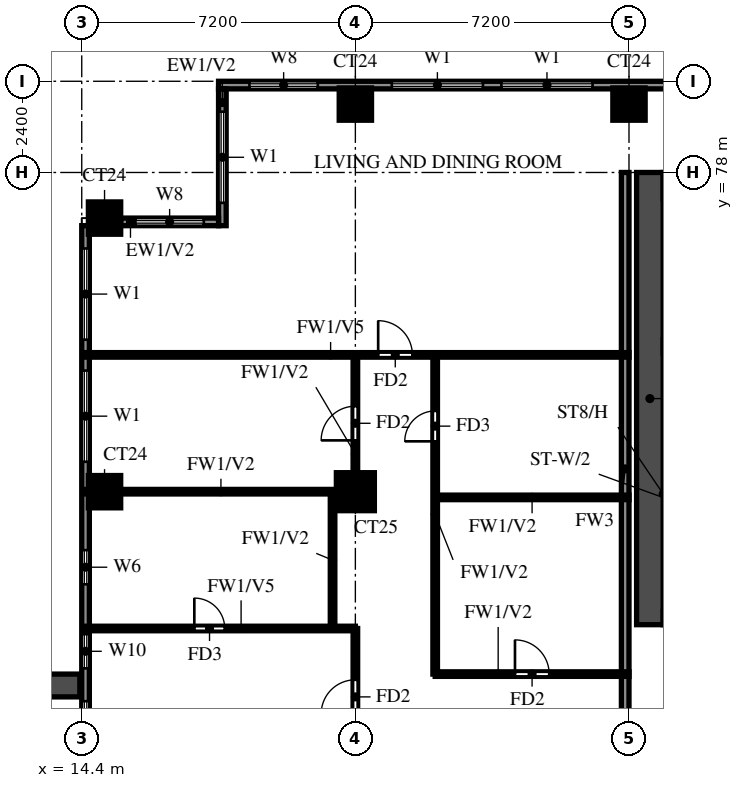
"""IFC4 building model, lengths in metres.
Left out: names, types, materials, properties, quantities, classifications, styles, units other than length and angle.
Written with IfcOpenShell. Run it as: python <this file> out.ifc"""

import sys

from ifc_helpers import new_model, si_unit, direction, frame, frame_2d, origin, origin_2d, place, context, subcontext, project, spatial, rectangle, extrude, source, transform, mapped, element, fill, save


model = new_model("IFC4")
c1 = context("Model", 3, precision=1e-05, world=origin(), true_north=direction((0.0, 1.0)))
c2 = subcontext(c1, "Body", "Model", "MODEL_VIEW")
j1 = project(units=[si_unit("LENGTHUNIT", "METRE"), si_unit("PLANEANGLEUNIT", "RADIAN")], contexts=[c1])
p1 = place(None, origin())
s1 = spatial("IfcSite", under=j1, at=p1, CompositionType="ELEMENT")
p2 = place(p1, origin())
s2 = spatial("IfcBuilding", under=s1, at=p2, CompositionType="ELEMENT")
p3 = place(p2, frame((0.0, 0.0, 167.5)))
s3 = spatial("IfcBuildingStorey", under=s2, at=p3, CompositionType="ELEMENT", Elevation=167.5)
m1 = source(origin(), c2, "Body", "SweptSolid", [
    extrude(rectangle(XDim=0.85, YDim=0.85, at=origin_2d()), origin(), (0.0, 0.0, 1.0), 3.2),
])
p4 = place(p3, frame((15.0, 69.6, 0.0), z_axis=(0.0, 0.0, 1.0), x_axis=(1.0, 0.0, 0.0)))
e1 = element("IfcColumn", 1, at=p4, inside=s3, PredefinedType="COLUMN", context=c2, shape_type="MappedRepresentation", body=[
    mapped(m1, transform((0.0, 0.0, 0.0))),
])
m2 = source(origin(), c2, "Body", "SweptSolid", [
    extrude(rectangle(XDim=1.0, YDim=1.0, at=origin_2d()), origin(), (0.0, 0.0, 1.0), 3.2),
])
p5 = place(p3, frame((21.6, 69.6, 0.0), z_axis=(0.0, 0.0, 1.0), x_axis=(1.0, 0.0, 0.0)))
e2 = element("IfcColumn", 2, at=p5, inside=s3, PredefinedType="COLUMN", context=c2, shape_type="MappedRepresentation", body=[
    mapped(m2, transform((0.0, 0.0, 0.0))),
])
for number, where, z_axis, x_axis in (
    (3, (15.0, 76.8, 0.0), (0.0, 0.0, 1.0), (1.0, 0.0, 0.0)),
    (4, (21.6, 79.8, 0.0), (0.0, 0.0, 1.0), (1.0, 0.0, 0.0)),
    (5, (28.8, 79.8, 0.0), (0.0, 0.0, 1.0), (1.0, 0.0, 0.0)),
):
    element("IfcColumn", number, at=place(p3, frame(where, z_axis=z_axis, x_axis=x_axis)), inside=s3, PredefinedType="COLUMN", context=c2, shape_type="MappedRepresentation", body=[
        mapped(m1, transform((0.0, 0.0, 0.0))),
    ])
p6 = place(p3, frame((29.35, 66.1, 0.0), z_axis=(0.0, 0.0, 1.0), x_axis=(0.0, 1.0, 0.0)))
e6 = element("IfcWall", 6, at=p6, inside=s3, PredefinedType="SHEAR", context=c2, shape_type="SweptSolid", body=[
    extrude(rectangle(XDim=11.9, YDim=0.7, at=frame_2d((5.95, 0.0))), origin(), (0.0, 0.0, 1.0), 3.2),
])
p7 = place(p3, frame((72.0, 80.3, 0.0), z_axis=(0.0, 0.0, 1.0), x_axis=(-1.0, 0.0, 0.0)))
e7 = element("IfcWall", 7, at=p7, inside=s3, PredefinedType="SOLIDWALL", context=c2, shape_type="SweptSolid", body=[
    extrude(rectangle(XDim=54.0, YDim=0.2, at=frame_2d((27.0, 0.0))), origin(), (0.0, 0.0, 1.0), 3.2),
])
p8 = place(p7, frame((44.158, 0.0, 0.6)))
e8 = element("IfcOpeningElement", 8, at=p8, cuts=e7, PredefinedType="OPENING", context=c2, shape_type="SweptSolid", body=[
    extrude(rectangle(XDim=2.4, YDim=2.4, at=frame_2d((1.2, 1.2))), frame((0.0, 0.11, 0.0), z_axis=(0.0, -1.0, 0.0), x_axis=(1.0, 0.0, 0.0)), (0.0, 0.0, 1.0), 0.22),
])
p9 = place(p7, frame((47.042, 0.0, 0.6)))
e9 = element("IfcOpeningElement", 9, at=p9, cuts=e7, PredefinedType="OPENING", context=c2, shape_type="SweptSolid", body=[
    extrude(rectangle(XDim=2.4, YDim=2.4, at=frame_2d((1.2, 1.2))), frame((0.0, 0.11, 0.0), z_axis=(0.0, -1.0, 0.0), x_axis=(1.0, 0.0, 0.0)), (0.0, 0.0, 1.0), 0.22),
])
p10 = place(p7, frame((51.387, 0.0, 0.6)))
e10 = element("IfcOpeningElement", 10, at=p10, cuts=e7, PredefinedType="OPENING", context=c2, shape_type="SweptSolid", body=[
    extrude(rectangle(XDim=1.8, YDim=2.4, at=frame_2d((0.9, 1.2))), frame((0.0, 0.11, 0.0), z_axis=(0.0, -1.0, 0.0), x_axis=(1.0, 0.0, 0.0)), (0.0, 0.0, 1.0), 0.22),
])
p11 = place(p3, frame((18.1, 80.2, 0.0), z_axis=(0.0, 0.0, 1.0), x_axis=(0.0, -1.0, 0.0)))
e11 = element("IfcWall", 11, at=p11, inside=s3, PredefinedType="SOLIDWALL", context=c2, shape_type="SweptSolid", body=[
    extrude(rectangle(XDim=3.6, YDim=0.2, at=frame_2d((1.8, 0.0))), origin(), (0.0, 0.0, 1.0), 3.2),
])
p12 = place(p11, frame((0.6, 0.0, 0.6)))
e12 = element("IfcOpeningElement", 12, at=p12, cuts=e11, PredefinedType="OPENING", context=c2, shape_type="SweptSolid", body=[
    extrude(rectangle(XDim=2.4, YDim=2.4, at=frame_2d((1.2, 1.2))), frame((0.0, 0.11, 0.0), z_axis=(0.0, -1.0, 0.0), x_axis=(1.0, 0.0, 0.0)), (0.0, 0.0, 1.0), 0.22),
])
p13 = place(p3, frame((18.0, 76.7, 0.0), z_axis=(0.0, 0.0, 1.0), x_axis=(-1.0, 0.0, 0.0)))
e13 = element("IfcWall", 13, at=p13, inside=s3, PredefinedType="SOLIDWALL", context=c2, shape_type="SweptSolid", body=[
    extrude(rectangle(XDim=2.575, YDim=0.2, at=frame_2d((1.288, 0.0))), origin(), (0.0, 0.0, 1.0), 3.2),
])
p14 = place(p13, frame((0.387, 0.0, 0.6)))
e14 = element("IfcOpeningElement", 14, at=p14, cuts=e13, PredefinedType="OPENING", context=c2, shape_type="SweptSolid", body=[
    extrude(rectangle(XDim=1.8, YDim=2.4, at=frame_2d((0.9, 1.2))), frame((0.0, 0.11, 0.0), z_axis=(0.0, -1.0, 0.0), x_axis=(1.0, 0.0, 0.0)), (0.0, 0.0, 1.0), 0.22),
])
p15 = place(p3, frame((14.5, 76.6, 0.0), z_axis=(0.0, 0.0, 1.0), x_axis=(0.0, -1.0, 0.0)))
e15 = element("IfcWall", 15, at=p15, inside=s3, PredefinedType="SOLIDWALL", context=c2, shape_type="SweptSolid", body=[
    extrude(rectangle(XDim=33.4, YDim=0.2, at=frame_2d((16.7, 0.0))), origin(), (0.0, 0.0, 1.0), 3.2),
])
p16 = place(p15, frame((15.1, 0.0, 0.0)))
e16 = element("IfcOpeningElement", 16, at=p16, cuts=e15, PredefinedType="OPENING", context=c2, shape_type="SweptSolid", body=[
    extrude(rectangle(XDim=1.8, YDim=2.4, at=frame_2d((0.9, 1.2))), frame((0.0, 0.11, 0.0), z_axis=(0.0, -1.0, 0.0), x_axis=(1.0, 0.0, 0.0)), (0.0, 0.0, 1.0), 0.22),
])
p17 = place(p15, frame((29.887, 0.0, 0.6)))
e17 = element("IfcOpeningElement", 17, at=p17, cuts=e15, PredefinedType="OPENING", context=c2, shape_type="SweptSolid", body=[
    extrude(rectangle(XDim=2.4, YDim=2.4, at=frame_2d((1.2, 1.2))), frame((0.0, 0.11, 0.0), z_axis=(0.0, -1.0, 0.0), x_axis=(1.0, 0.0, 0.0)), (0.0, 0.0, 1.0), 0.22),
])
p18 = place(p15, frame((25.413, 0.0, 0.6)))
e18 = element("IfcOpeningElement", 18, at=p18, cuts=e15, PredefinedType="OPENING", context=c2, shape_type="SweptSolid", body=[
    extrude(rectangle(XDim=2.4, YDim=2.4, at=frame_2d((1.2, 1.2))), frame((0.0, 0.11, 0.0), z_axis=(0.0, -1.0, 0.0), x_axis=(1.0, 0.0, 0.0)), (0.0, 0.0, 1.0), 0.22),
])
p19 = place(p15, frame((22.938, 0.0, 1.5)))
e19 = element("IfcOpeningElement", 19, at=p19, cuts=e15, PredefinedType="OPENING", context=c2, shape_type="SweptSolid", body=[
    extrude(rectangle(XDim=0.9, YDim=0.9, at=frame_2d((0.45, 0.45))), frame((0.0, 0.11, 0.0), z_axis=(0.0, -1.0, 0.0), x_axis=(1.0, 0.0, 0.0)), (0.0, 0.0, 1.0), 0.22),
])
p20 = place(p15, frame((17.35, 0.0, 0.6)))
e20 = element("IfcOpeningElement", 20, at=p20, cuts=e15, PredefinedType="OPENING", context=c2, shape_type="SweptSolid", body=[
    extrude(rectangle(XDim=0.9, YDim=2.4, at=frame_2d((0.45, 1.2))), frame((0.0, 0.11, 0.0), z_axis=(0.0, -1.0, 0.0), x_axis=(1.0, 0.0, 0.0)), (0.0, 0.0, 1.0), 0.22),
])
p21 = place(p15, frame((19.113, 0.0, 0.6)))
e21 = element("IfcOpeningElement", 21, at=p21, cuts=e15, PredefinedType="OPENING", context=c2, shape_type="SweptSolid", body=[
    extrude(rectangle(XDim=1.8, YDim=2.4, at=frame_2d((0.9, 1.2))), frame((0.0, 0.11, 0.0), z_axis=(0.0, -1.0, 0.0), x_axis=(1.0, 0.0, 0.0)), (0.0, 0.0, 1.0), 0.22),
])
p22 = place(p15, frame((10.75, 0.0, 0.6)))
e22 = element("IfcOpeningElement", 22, at=p22, cuts=e15, PredefinedType="OPENING", context=c2, shape_type="SweptSolid", body=[
    extrude(rectangle(XDim=0.9, YDim=2.4, at=frame_2d((0.45, 1.2))), frame((0.0, 0.11, 0.0), z_axis=(0.0, -1.0, 0.0), x_axis=(1.0, 0.0, 0.0)), (0.0, 0.0, 1.0), 0.22),
])
p23 = place(p15, frame((12.512, 0.0, 0.6)))
e23 = element("IfcOpeningElement", 23, at=p23, cuts=e15, PredefinedType="OPENING", context=c2, shape_type="SweptSolid", body=[
    extrude(rectangle(XDim=1.2, YDim=2.4, at=frame_2d((0.6, 1.2))), frame((0.0, 0.11, 0.0), z_axis=(0.0, -1.0, 0.0), x_axis=(1.0, 0.0, 0.0)), (0.0, 0.0, 1.0), 0.22),
])
p24 = place(p15, frame((8.538, 0.0, 1.5)))
e24 = element("IfcOpeningElement", 24, at=p24, cuts=e15, PredefinedType="OPENING", context=c2, shape_type="SweptSolid", body=[
    extrude(rectangle(XDim=0.9, YDim=0.9, at=frame_2d((0.45, 0.45))), frame((0.0, 0.11, 0.0), z_axis=(0.0, -1.0, 0.0), x_axis=(1.0, 0.0, 0.0)), (0.0, 0.0, 1.0), 0.22),
])
p25 = place(p15, frame((3.812, 0.0, 0.6)))
e25 = element("IfcOpeningElement", 25, at=p25, cuts=e15, PredefinedType="OPENING", context=c2, shape_type="SweptSolid", body=[
    extrude(rectangle(XDim=2.4, YDim=2.4, at=frame_2d((1.2, 1.2))), frame((0.0, 0.11, 0.0), z_axis=(0.0, -1.0, 0.0), x_axis=(1.0, 0.0, 0.0)), (0.0, 0.0, 1.0), 0.22),
])
p26 = place(p15, frame((0.6, 0.0, 0.6)))
e26 = element("IfcOpeningElement", 26, at=p26, cuts=e15, PredefinedType="OPENING", context=c2, shape_type="SweptSolid", body=[
    extrude(rectangle(XDim=2.4, YDim=2.4, at=frame_2d((1.2, 1.2))), frame((0.0, 0.11, 0.0), z_axis=(0.0, -1.0, 0.0), x_axis=(1.0, 0.0, 0.0)), (0.0, 0.0, 1.0), 0.22),
])
p27 = place(p3, frame((14.35, 64.5, 0.0), z_axis=(0.0, 0.0, 1.0), x_axis=(-1.0, 0.0, 0.0)))
e27 = element("IfcWall", 27, at=p27, inside=s3, PredefinedType="SOLIDWALL", context=c2, shape_type="SweptSolid", body=[
    extrude(rectangle(XDim=2.65, YDim=0.6, at=frame_2d((1.325, 0.0))), origin(), (0.0, 0.0, 1.0), 2.85),
])
p28 = place(p3, frame((28.7, 62.4, 0.0), z_axis=(0.0, 0.0, 1.0), x_axis=(0.0, 1.0, 0.0)))
e28 = element("IfcWall", 28, at=p28, inside=s3, PredefinedType="SOLIDWALL", context=c2, shape_type="SweptSolid", body=[
    extrude(rectangle(XDim=15.6, YDim=0.2, at=frame_2d((7.8, 0.0))), origin(), (0.0, 0.0, 1.0), 3.2),
])
p29 = place(p3, frame((23.7, 64.8, 0.0), z_axis=(0.0, 0.0, 1.0), x_axis=(1.0, 0.0, 0.0)))
e29 = element("IfcWall", 29, at=p29, inside=s3, PredefinedType="PARTITIONING", context=c2, shape_type="SweptSolid", body=[
    extrude(rectangle(XDim=5.1, YDim=0.12, at=frame_2d((2.55, 0.0))), origin(), (0.0, 0.0, 1.0), 3.2),
])
p30 = place(p29, frame((2.1, 0.0, 0.0)))
e30 = element("IfcOpeningElement", 30, at=p30, cuts=e29, PredefinedType="OPENING", context=c2, shape_type="SweptSolid", body=[
    extrude(rectangle(XDim=0.9, YDim=2.1, at=frame_2d((0.45, 1.05))), frame((0.0, 0.07, 0.0), z_axis=(0.0, -1.0, 0.0), x_axis=(1.0, 0.0, 0.0)), (0.0, 0.0, 1.0), 0.14),
])
p31 = place(p3, frame((14.525, 66.0, 0.0), z_axis=(0.0, 0.0, 1.0), x_axis=(1.0, 0.0, 0.0)))
e31 = element("IfcWall", 31, at=p31, inside=s3, PredefinedType="PARTITIONING", context=c2, shape_type="SweptSolid", body=[
    extrude(rectangle(XDim=7.075, YDim=0.12, at=frame_2d((3.538, 0.0))), origin(), (0.0, 0.0, 1.0), 2.3),
])
p32 = place(p31, frame((2.837, 0.0, 0.0)))
e32 = element("IfcOpeningElement", 32, at=p32, cuts=e31, PredefinedType="OPENING", context=c2, shape_type="SweptSolid", body=[
    extrude(rectangle(XDim=0.8, YDim=2.1, at=frame_2d((0.4, 1.05))), frame((0.0, 0.07, 0.0), z_axis=(0.0, -1.0, 0.0), x_axis=(1.0, 0.0, 0.0)), (0.0, 0.0, 1.0), 0.14),
])
p33 = place(p3, frame((23.7, 69.45, 0.0), z_axis=(0.0, 0.0, 1.0), x_axis=(1.0, 0.0, 0.0)))
e33 = element("IfcWall", 33, at=p33, inside=s3, PredefinedType="PARTITIONING", context=c2, shape_type="SweptSolid", body=[
    extrude(rectangle(XDim=5.1, YDim=0.12, at=frame_2d((2.55, 0.0))), origin(), (0.0, 0.0, 1.0), 3.2),
])
p34 = place(p3, frame((14.525, 69.6, 0.0), z_axis=(0.0, 0.0, 1.0), x_axis=(1.0, 0.0, 0.0)))
e34 = element("IfcWall", 34, at=p34, inside=s3, PredefinedType="PARTITIONING", context=c2, shape_type="SweptSolid", body=[
    extrude(rectangle(XDim=7.075, YDim=0.12, at=frame_2d((3.538, 0.0))), origin(), (0.0, 0.0, 1.0), 3.2),
])
p35 = place(p3, frame((14.525, 73.2, 0.0), z_axis=(0.0, 0.0, 1.0), x_axis=(1.0, 0.0, 0.0)))
e35 = element("IfcWall", 35, at=p35, inside=s3, PredefinedType="PARTITIONING", context=c2, shape_type="SweptSolid", body=[
    extrude(rectangle(XDim=14.275, YDim=0.12, at=frame_2d((7.138, 0.0))), origin(), (0.0, 0.0, 1.0), 2.3),
])
p36 = place(p35, frame((7.675, 0.0, 0.0)))
e36 = element("IfcOpeningElement", 36, at=p36, cuts=e35, PredefinedType="OPENING", context=c2, shape_type="SweptSolid", body=[
    extrude(rectangle(XDim=0.9, YDim=2.1, at=frame_2d((0.45, 1.05))), frame((0.0, 0.07, 0.0), z_axis=(0.0, -1.0, 0.0), x_axis=(1.0, 0.0, 0.0)), (0.0, 0.0, 1.0), 0.14),
])
p37 = place(p3, frame((21.0, 66.0, 0.0), z_axis=(0.0, 0.0, 1.0), x_axis=(0.0, 1.0, 0.0)))
e37 = element("IfcWall", 37, at=p37, inside=s3, PredefinedType="PARTITIONING", context=c2, shape_type="SweptSolid", body=[
    extrude(rectangle(XDim=3.6, YDim=0.12, at=frame_2d((1.8, 0.0))), origin(), (0.0, 0.0, 1.0), 3.2),
])
p38 = place(p3, frame((21.6, 55.2, 0.0), z_axis=(0.0, 0.0, 1.0), x_axis=(0.0, 1.0, 0.0)))
e38 = element("IfcWall", 38, at=p38, inside=s3, PredefinedType="PARTITIONING", context=c2, shape_type="SweptSolid", body=[
    extrude(rectangle(XDim=10.8, YDim=0.12, at=frame_2d((5.4, 0.0))), origin(), (0.0, 0.0, 1.0), 3.2),
])
p39 = place(p38, frame((2.85, 0.0, 0.0)))
e39 = element("IfcOpeningElement", 39, at=p39, cuts=e38, PredefinedType="OPENING", context=c2, shape_type="SweptSolid", body=[
    extrude(rectangle(XDim=1.5, YDim=2.1, at=frame_2d((0.75, 1.05))), frame((0.0, 0.07, 0.0), z_axis=(0.0, -1.0, 0.0), x_axis=(1.0, 0.0, 0.0)), (0.0, 0.0, 1.0), 0.14),
])
p40 = place(p38, frame((8.55, 0.0, 0.0)))
e40 = element("IfcOpeningElement", 40, at=p40, cuts=e38, PredefinedType="OPENING", context=c2, shape_type="SweptSolid", body=[
    extrude(rectangle(XDim=0.9, YDim=2.1, at=frame_2d((0.45, 1.05))), frame((0.0, 0.07, 0.0), z_axis=(0.0, -1.0, 0.0), x_axis=(1.0, 0.0, 0.0)), (0.0, 0.0, 1.0), 0.14),
])
p41 = place(p3, frame((21.6, 69.6, 0.0), z_axis=(0.0, 0.0, 1.0), x_axis=(0.0, 1.0, 0.0)))
e41 = element("IfcWall", 41, at=p41, inside=s3, PredefinedType="PARTITIONING", context=c2, shape_type="SweptSolid", body=[
    extrude(rectangle(XDim=3.6, YDim=0.12, at=frame_2d((1.8, 0.0))), origin(), (0.0, 0.0, 1.0), 3.2),
])
p42 = place(p41, frame((1.35, 0.0, 0.0)))
e42 = element("IfcOpeningElement", 42, at=p42, cuts=e41, PredefinedType="OPENING", context=c2, shape_type="SweptSolid", body=[
    extrude(rectangle(XDim=0.9, YDim=2.1, at=frame_2d((0.45, 1.05))), frame((0.0, 0.07, 0.0), z_axis=(0.0, -1.0, 0.0), x_axis=(1.0, 0.0, 0.0)), (0.0, 0.0, 1.0), 0.14),
])
p43 = place(p3, frame((23.7, 64.8, 0.0), z_axis=(0.0, 0.0, 1.0), x_axis=(0.0, 1.0, 0.0)))
e43 = element("IfcWall", 43, at=p43, inside=s3, PredefinedType="PARTITIONING", context=c2, shape_type="SweptSolid", body=[
    extrude(rectangle(XDim=8.4, YDim=0.12, at=frame_2d((4.2, 0.0))), origin(), (0.0, 0.0, 1.0), 3.2),
])
p44 = place(p43, frame((6.125, 0.0, 0.0)))
e44 = element("IfcOpeningElement", 44, at=p44, cuts=e43, PredefinedType="OPENING", context=c2, shape_type="SweptSolid", body=[
    extrude(rectangle(XDim=0.8, YDim=2.1, at=frame_2d((0.4, 1.05))), frame((0.0, 0.07, 0.0), z_axis=(0.0, -1.0, 0.0), x_axis=(1.0, 0.0, 0.0)), (0.0, 0.0, 1.0), 0.14),
])
p45 = place(p8, origin())
e45 = element("IfcWindow", 45, at=p45, inside=s3, PartitioningType="DOUBLE_PANEL_VERTICAL", PredefinedType="WINDOW", context=c2, shape_type="SweptSolid", body=[
    extrude(rectangle(XDim=2.4, YDim=2.4, at=frame_2d((1.2, 1.2))), frame((0.0, 0.03, 0.0), z_axis=(0.0, -1.0, 0.0), x_axis=(1.0, 0.0, 0.0)), (0.0, 0.0, 1.0), 0.06),
])
fill(e8, e45)
p46 = place(p9, origin())
e46 = element("IfcWindow", 46, at=p46, inside=s3, PartitioningType="DOUBLE_PANEL_VERTICAL", PredefinedType="WINDOW", context=c2, shape_type="SweptSolid", body=[
    extrude(rectangle(XDim=2.4, YDim=2.4, at=frame_2d((1.2, 1.2))), frame((0.0, 0.03, 0.0), z_axis=(0.0, -1.0, 0.0), x_axis=(1.0, 0.0, 0.0)), (0.0, 0.0, 1.0), 0.06),
])
fill(e9, e46)
p47 = place(p10, origin())
e47 = element("IfcWindow", 47, at=p47, inside=s3, PartitioningType="DOUBLE_PANEL_VERTICAL", PredefinedType="WINDOW", context=c2, shape_type="SweptSolid", body=[
    extrude(rectangle(XDim=1.8, YDim=2.4, at=frame_2d((0.9, 1.2))), frame((0.0, 0.03, 0.0), z_axis=(0.0, -1.0, 0.0), x_axis=(1.0, 0.0, 0.0)), (0.0, 0.0, 1.0), 0.06),
])
fill(e10, e47)
p48 = place(p12, origin())
e48 = element("IfcWindow", 48, at=p48, inside=s3, PartitioningType="DOUBLE_PANEL_VERTICAL", PredefinedType="WINDOW", context=c2, shape_type="SweptSolid", body=[
    extrude(rectangle(XDim=2.4, YDim=2.4, at=frame_2d((1.2, 1.2))), frame((0.0, 0.03, 0.0), z_axis=(0.0, -1.0, 0.0), x_axis=(1.0, 0.0, 0.0)), (0.0, 0.0, 1.0), 0.06),
])
fill(e12, e48)
p49 = place(p14, origin())
e49 = element("IfcWindow", 49, at=p49, inside=s3, PartitioningType="DOUBLE_PANEL_VERTICAL", PredefinedType="WINDOW", context=c2, shape_type="SweptSolid", body=[
    extrude(rectangle(XDim=1.8, YDim=2.4, at=frame_2d((0.9, 1.2))), frame((0.0, 0.03, 0.0), z_axis=(0.0, -1.0, 0.0), x_axis=(1.0, 0.0, 0.0)), (0.0, 0.0, 1.0), 0.06),
])
fill(e14, e49)
p50 = place(p22, origin())
e50 = element("IfcWindow", 50, at=p50, inside=s3, PartitioningType="SINGLE_PANEL", PredefinedType="WINDOW", context=c2, shape_type="SweptSolid", body=[
    extrude(rectangle(XDim=0.9, YDim=2.4, at=frame_2d((0.45, 1.2))), frame((0.0, 0.03, 0.0), z_axis=(0.0, -1.0, 0.0), x_axis=(1.0, 0.0, 0.0)), (0.0, 0.0, 1.0), 0.06),
])
fill(e22, e50)
p51 = place(p23, origin())
e51 = element("IfcWindow", 51, at=p51, inside=s3, PartitioningType="SINGLE_PANEL", PredefinedType="WINDOW", context=c2, shape_type="SweptSolid", body=[
    extrude(rectangle(XDim=1.2, YDim=2.4, at=frame_2d((0.6, 1.2))), frame((0.0, 0.03, 0.0), z_axis=(0.0, -1.0, 0.0), x_axis=(1.0, 0.0, 0.0)), (0.0, 0.0, 1.0), 0.06),
])
fill(e23, e51)
p52 = place(p24, origin())
e52 = element("IfcWindow", 52, at=p52, inside=s3, PartitioningType="SINGLE_PANEL", PredefinedType="WINDOW", context=c2, shape_type="SweptSolid", body=[
    extrude(rectangle(XDim=0.9, YDim=0.9, at=frame_2d((0.45, 0.45))), frame((0.0, 0.03, 0.0), z_axis=(0.0, -1.0, 0.0), x_axis=(1.0, 0.0, 0.0)), (0.0, 0.0, 1.0), 0.06),
])
fill(e24, e52)
p53 = place(p25, origin())
e53 = element("IfcWindow", 53, at=p53, inside=s3, PartitioningType="DOUBLE_PANEL_VERTICAL", PredefinedType="WINDOW", context=c2, shape_type="SweptSolid", body=[
    extrude(rectangle(XDim=2.4, YDim=2.4, at=frame_2d((1.2, 1.2))), frame((0.0, 0.03, 0.0), z_axis=(0.0, -1.0, 0.0), x_axis=(1.0, 0.0, 0.0)), (0.0, 0.0, 1.0), 0.06),
])
fill(e25, e53)
p54 = place(p26, origin())
e54 = element("IfcWindow", 54, at=p54, inside=s3, PartitioningType="DOUBLE_PANEL_VERTICAL", PredefinedType="WINDOW", context=c2, shape_type="SweptSolid", body=[
    extrude(rectangle(XDim=2.4, YDim=2.4, at=frame_2d((1.2, 1.2))), frame((0.0, 0.03, 0.0), z_axis=(0.0, -1.0, 0.0), x_axis=(1.0, 0.0, 0.0)), (0.0, 0.0, 1.0), 0.06),
])
fill(e26, e54)
p55 = place(p40, origin())
e55 = element("IfcDoor", 55, at=p55, inside=s3, OperationType="SINGLE_SWING_LEFT", PredefinedType="DOOR", context=c2, shape_type="SweptSolid", body=[
    extrude(rectangle(XDim=0.9, YDim=2.1, at=frame_2d((0.45, 1.05))), frame((0.0, 0.025, 0.0), z_axis=(0.0, -1.0, 0.0), x_axis=(1.0, 0.0, 0.0)), (0.0, 0.0, 1.0), 0.05),
])
fill(e40, e55)
p56 = place(p32, origin())
e56 = element("IfcDoor", 56, at=p56, inside=s3, OperationType="SINGLE_SWING_LEFT", PredefinedType="DOOR", context=c2, shape_type="SweptSolid", body=[
    extrude(rectangle(XDim=0.8, YDim=2.1, at=frame_2d((0.4, 1.05))), frame((0.0, 0.025, 0.0), z_axis=(0.0, -1.0, 0.0), x_axis=(1.0, 0.0, 0.0)), (0.0, 0.0, 1.0), 0.05),
])
fill(e32, e56)
p57 = place(p42, origin())
e57 = element("IfcDoor", 57, at=p57, inside=s3, OperationType="SINGLE_SWING_RIGHT", PredefinedType="DOOR", context=c2, shape_type="SweptSolid", body=[
    extrude(rectangle(XDim=0.9, YDim=2.1, at=frame_2d((0.45, 1.05))), frame((0.0, 0.025, 0.0), z_axis=(0.0, -1.0, 0.0), x_axis=(1.0, 0.0, 0.0)), (0.0, 0.0, 1.0), 0.05),
])
fill(e42, e57)
p58 = place(p36, origin())
e58 = element("IfcDoor", 58, at=p58, inside=s3, OperationType="SINGLE_SWING_LEFT", PredefinedType="DOOR", context=c2, shape_type="SweptSolid", body=[
    extrude(rectangle(XDim=0.9, YDim=2.1, at=frame_2d((0.45, 1.05))), frame((0.0, 0.025, 0.0), z_axis=(0.0, -1.0, 0.0), x_axis=(1.0, 0.0, 0.0)), (0.0, 0.0, 1.0), 0.05),
])
fill(e36, e58)
p59 = place(p30, origin())
e59 = element("IfcDoor", 59, at=p59, inside=s3, OperationType="SINGLE_SWING_LEFT", PredefinedType="DOOR", context=c2, shape_type="SweptSolid", body=[
    extrude(rectangle(XDim=0.9, YDim=2.1, at=frame_2d((0.45, 1.05))), frame((0.0, 0.025, 0.0), z_axis=(0.0, -1.0, 0.0), x_axis=(1.0, 0.0, 0.0)), (0.0, 0.0, 1.0), 0.05),
])
fill(e30, e59)
p60 = place(p44, origin())
e60 = element("IfcDoor", 60, at=p60, inside=s3, OperationType="SINGLE_SWING_RIGHT", PredefinedType="DOOR", context=c2, shape_type="SweptSolid", body=[
    extrude(rectangle(XDim=0.8, YDim=2.1, at=frame_2d((0.4, 1.05))), frame((0.0, 0.025, 0.0), z_axis=(0.0, -1.0, 0.0), x_axis=(1.0, 0.0, 0.0)), (0.0, 0.0, 1.0), 0.05),
])
fill(e44, e60)
save(model, sys.argv[1])
